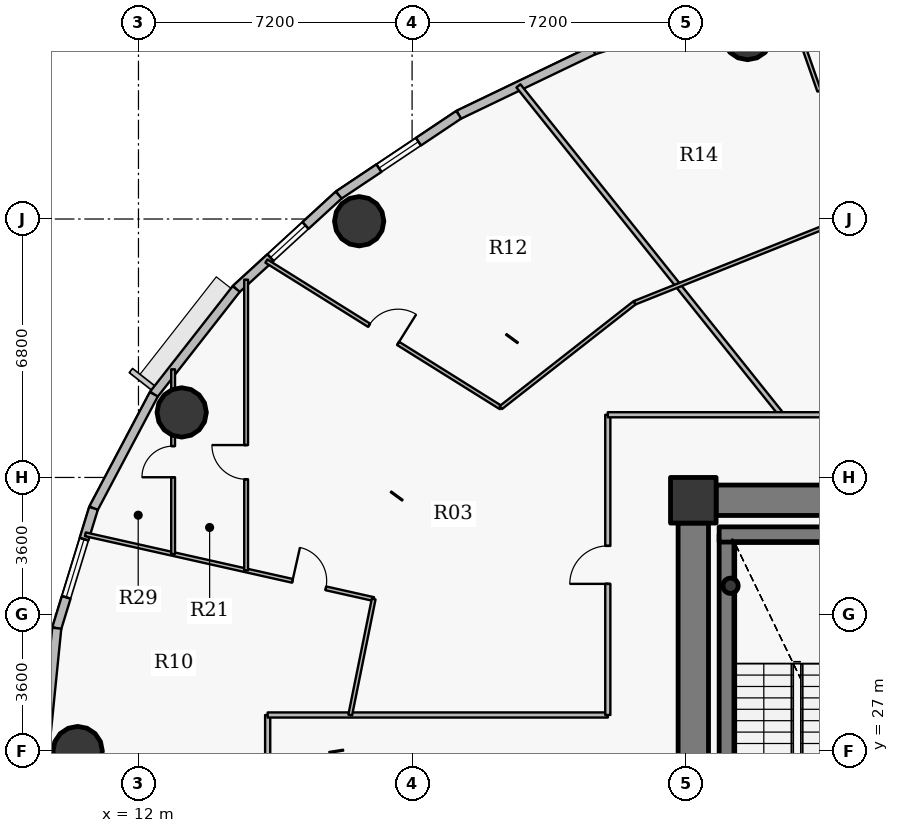
"""IFC4 building model, lengths in metres.
Left out: names, types, materials, properties, quantities, classifications, styles, units other than length and angle.
Written with IfcOpenShell. Run it as: python <this file> out.ifc"""

import sys

from ifc_helpers import new_model, si_unit, direction, frame, frame_2d, origin, origin_2d, place, context, subcontext, project, spatial, rectangle, hollow_circle, extrude, source, transform, mapped, element, fill, save


model = new_model("IFC4")
c1 = context("Model", 3, precision=1e-05, world=origin(), true_north=direction((0.0, 1.0)))
c2 = subcontext(c1, "Body", "Model", "MODEL_VIEW")
j1 = project(units=[si_unit("LENGTHUNIT", "METRE"), si_unit("PLANEANGLEUNIT", "RADIAN")], contexts=[c1])
p1 = place(None, origin())
s1 = spatial("IfcSite", under=j1, at=p1, CompositionType="ELEMENT")
p2 = place(p1, origin())
s2 = spatial("IfcBuilding", under=s1, at=p2, CompositionType="ELEMENT")
p3 = place(p2, frame((0.0, 0.0, 174.9)))
s3 = spatial("IfcBuildingStorey", under=s2, at=p3, CompositionType="ELEMENT", Elevation=174.9)
p4 = place(p3, frame((26.6, 33.6, 0.0), z_axis=(0.0, 0.0, 1.0), x_axis=(1.0, 0.0, 0.0)))
e1 = element("IfcColumn", 1, at=p4, inside=s3, PredefinedType="COLUMN", context=c2, shape_type="SweptSolid", body=[
    extrude(rectangle(XDim=1.2, YDim=1.2, at=origin_2d()), origin(), (0.0, 0.0, 1.0), 3.75),
])
p5 = place(p3, frame((27.48, 24.1, 0.0), z_axis=(0.0, 0.0, 1.0), x_axis=(0.0, 1.0, 0.0)))
e2 = element("IfcWall", 2, at=p5, inside=s3, PredefinedType="SHEAR", context=c2, shape_type="SweptSolid", body=[
    extrude(rectangle(XDim=8.6, YDim=0.4, at=frame_2d((4.3, 0.0))), origin(), (0.0, 0.0, 1.0), 3.75),
])
p6 = place(p3, frame((27.28, 32.7, 0.0), z_axis=(0.0, 0.0, 1.0), x_axis=(1.0, 0.0, 0.0)))
e3 = element("IfcWall", 3, at=p6, inside=s3, PredefinedType="SHEAR", context=c2, shape_type="SweptSolid", body=[
    extrude(rectangle(XDim=4.1, YDim=0.4, at=frame_2d((2.05, 0.0))), origin(), (0.0, 0.0, 1.0), 3.75),
])
p7 = place(p3, frame((27.58, 31.35, 0.0), z_axis=(0.0, 0.0, 1.0), x_axis=(1.0, 0.0, 0.0)))
e4 = element("IfcColumn", 4, at=p7, inside=s3, PredefinedType="COLUMN", context=c2, shape_type="SweptSolid", body=[
    extrude(hollow_circle(Radius=0.203, WallThickness=0.016, at=origin_2d()), origin(), (0.0, 0.0, 1.0), 3.75),
])
p8 = place(p3, frame((27.2, 33.6, 0.0), z_axis=(0.0, 0.0, 1.0), x_axis=(1.0, 0.0, 0.0)))
e5 = element("IfcWall", 5, at=p8, inside=s3, PredefinedType="SHEAR", context=c2, shape_type="SweptSolid", body=[
    extrude(rectangle(XDim=17.6, YDim=0.8, at=frame_2d((8.8, 0.0))), origin(), (0.0, 0.0, 1.0), 2.95),
])
p9 = place(p8, frame((13.45, 0.0, 0.0)))
e6 = element("IfcOpeningElement", 6, at=p9, cuts=e5, PredefinedType="OPENING", context=c2, shape_type="SweptSolid", body=[
    extrude(rectangle(XDim=1.15, YDim=2.15, at=origin_2d()), frame((0.575, 0.41, 1.075), z_axis=(0.0, -1.0, 0.0), x_axis=(1.0, 0.0, 0.0)), (0.0, 0.0, 1.0), 0.82),
])
p10 = place(p3, frame((26.6, 21.0, 0.0), z_axis=(0.0, 0.0, 1.0), x_axis=(0.0, 1.0, 0.0)))
e7 = element("IfcWall", 7, at=p10, inside=s3, PredefinedType="SHEAR", context=c2, shape_type="SweptSolid", body=[
    extrude(rectangle(XDim=12.0, YDim=0.8, at=frame_2d((6.0, 0.0))), origin(), (0.0, 0.0, 1.0), 2.95),
])
p11 = place(p10, frame((1.061, 0.0, 0.0)))
e8 = element("IfcOpeningElement", 8, at=p11, cuts=e7, PredefinedType="OPENING", context=c2, shape_type="SweptSolid", body=[
    extrude(rectangle(XDim=1.15, YDim=2.15, at=origin_2d()), frame((0.575, 0.41, 1.075), z_axis=(0.0, -1.0, 0.0), x_axis=(1.0, 0.0, 0.0)), (0.0, 0.0, 1.0), 0.82),
])
for number, where, z_axis, x_axis in (
    (9, (28.027, 45.841, 0.0), (0.0, 0.0, 1.0), (1.0, 0.0, 0.0)),
    (10, (17.808, 40.942, 0.0), (0.0, 0.0, 1.0), (1.0, 0.0, 0.0)),
    (11, (13.137, 35.911, 0.0), (0.0, 0.0, 1.0), (1.0, 0.0, 0.0)),
    (12, (10.4, 27.0, 0.0), (0.0, 0.0, 1.0), (1.0, 0.0, 0.0)),
):
    element("IfcColumn", number, at=place(p3, frame(where, z_axis=z_axis, x_axis=x_axis)), inside=s3, PredefinedType="COLUMN", context=c2, shape_type="SweptSolid", body=[
        extrude(hollow_circle(Radius=0.65, WallThickness=0.04, at=origin_2d()), origin(), (0.0, 0.0, 1.0), 3.75),
    ])
p12 = place(p3, frame((23.97, 45.444, 0.0), z_axis=(0.0, 0.0, 1.0), x_axis=(0.951209870236, 0.30854462038, 0.0)))
e13 = element("IfcWall", 13, at=p12, inside=s3, PredefinedType="SOLIDWALL", context=c2, shape_type="SweptSolid", body=[
    extrude(rectangle(XDim=4.038, YDim=0.24, at=frame_2d((2.019, 0.0))), origin(), (0.0, 0.0, 1.0), 3.5),
])
p13 = place(p12, frame((1.019, 0.0, 0.9)))
e14 = element("IfcOpeningElement", 14, at=p13, cuts=e13, PredefinedType="OPENING", context=c2, shape_type="SweptSolid", body=[
    extrude(rectangle(XDim=2.0, YDim=1.75, at=origin_2d()), frame((1.0, 0.13, 0.875), z_axis=(0.0, -1.0, 0.0), x_axis=(1.0, 0.0, 0.0)), (0.0, 0.0, 1.0), 0.26),
])
p14 = place(p3, frame((20.427, 43.743, 0.0), z_axis=(0.0, 0.0, 1.0), x_axis=(0.901564733809, 0.432644231155, 0.0)))
e15 = element("IfcWall", 15, at=p14, inside=s3, PredefinedType="SOLIDWALL", context=c2, shape_type="SweptSolid", body=[
    extrude(rectangle(XDim=3.93, YDim=0.24, at=frame_2d((1.965, 0.0))), origin(), (0.0, 0.0, 1.0), 3.5),
])
p15 = place(p3, frame((17.268, 41.631, 0.0), z_axis=(0.0, 0.0, 1.0), x_axis=(0.831228998277, 0.555930168657, 0.0)))
e16 = element("IfcWall", 16, at=p15, inside=s3, PredefinedType="SOLIDWALL", context=c2, shape_type="SweptSolid", body=[
    extrude(rectangle(XDim=3.8, YDim=0.24, at=frame_2d((1.9, 0.0))), origin(), (0.0, 0.0, 1.0), 3.5),
])
p16 = place(p15, frame((1.275, 0.0, 0.9)))
e17 = element("IfcOpeningElement", 17, at=p16, cuts=e16, PredefinedType="OPENING", context=c2, shape_type="SweptSolid", body=[
    extrude(rectangle(XDim=1.25, YDim=1.65, at=origin_2d()), frame((0.625, 0.13, 0.825), z_axis=(0.0, -1.0, 0.0), x_axis=(1.0, 0.0, 0.0)), (0.0, 0.0, 1.0), 0.26),
])
p17 = place(p3, frame((14.572, 39.158, 0.0), z_axis=(0.0, 0.0, 1.0), x_axis=(0.737076565834, 0.675809245349, 0.0)))
e18 = element("IfcWall", 18, at=p17, inside=s3, PredefinedType="SOLIDWALL", context=c2, shape_type="SweptSolid", body=[
    extrude(rectangle(XDim=3.658, YDim=0.24, at=frame_2d((1.829, 0.0))), origin(), (0.0, 0.0, 1.0), 3.5),
])
p18 = place(p17, frame((1.224, 0.0, 0.9)))
e19 = element("IfcOpeningElement", 19, at=p18, cuts=e18, PredefinedType="OPENING", context=c2, shape_type="SweptSolid", body=[
    extrude(rectangle(XDim=1.25, YDim=1.65, at=origin_2d()), frame((0.625, 0.13, 0.825), z_axis=(0.0, -1.0, 0.0), x_axis=(1.0, 0.0, 0.0)), (0.0, 0.0, 1.0), 0.26),
])
p19 = place(p3, frame((12.404, 36.388, 0.0), z_axis=(0.0, 0.0, 1.0), x_axis=(0.616287674549, 0.787521112224, 0.0)))
e20 = element("IfcWall", 20, at=p19, inside=s3, PredefinedType="SOLIDWALL", context=c2, shape_type="SweptSolid", body=[
    extrude(rectangle(XDim=3.517, YDim=0.24, at=frame_2d((1.759, 0.0))), origin(), (0.0, 0.0, 1.0), 3.5),
])
p20 = place(p3, frame((10.817, 33.389, 0.0), z_axis=(0.0, 0.0, 1.0), x_axis=(0.467586874938, 0.88394712194, 0.0)))
e21 = element("IfcWall", 21, at=p20, inside=s3, PredefinedType="SOLIDWALL", context=c2, shape_type="SweptSolid", body=[
    extrude(rectangle(XDim=3.393, YDim=0.24, at=frame_2d((1.697, 0.0))), origin(), (0.0, 0.0, 1.0), 3.5),
])
p21 = place(p3, frame((9.85, 30.234, 0.0), z_axis=(0.0, 0.0, 1.0), x_axis=(0.293097995113, 0.956082405058, 0.0)))
e22 = element("IfcWall", 22, at=p21, inside=s3, PredefinedType="SOLIDWALL", context=c2, shape_type="SweptSolid", body=[
    extrude(rectangle(XDim=3.3, YDim=0.24, at=frame_2d((1.65, 0.0))), origin(), (0.0, 0.0, 1.0), 3.5),
])
p22 = place(p21, frame((0.85, 0.0, 0.9)))
e23 = element("IfcOpeningElement", 23, at=p22, cuts=e22, PredefinedType="OPENING", context=c2, shape_type="SweptSolid", body=[
    extrude(rectangle(XDim=1.6, YDim=1.75, at=origin_2d()), frame((0.8, 0.13, 0.875), z_axis=(0.0, -1.0, 0.0), x_axis=(1.0, 0.0, 0.0)), (0.0, 0.0, 1.0), 0.26),
])
for number, where, z_axis, x_axis in (
    (24, (9.525, 27.0, 0.0), (0.0, 0.0, 1.0), (0.1, 0.995, 0.0)),
    (25, (9.85, 23.766, 0.0), (0.0, 0.0, 1.0), (-0.1, 0.995, 0.0)),
):
    element("IfcWall", number, at=place(p3, frame(where, z_axis=z_axis, x_axis=x_axis)), inside=s3, PredefinedType="SOLIDWALL", context=c2, shape_type="SweptSolid", body=[
        extrude(rectangle(XDim=3.25, YDim=0.24, at=frame_2d((1.625, 0.0))), origin(), (0.0, 0.0, 1.0), 3.5),
    ])
p23 = place(p3, frame((10.602, 32.704, 0.0), z_axis=(0.0, 0.0, 1.0), x_axis=(0.9756977614, -0.21912069368, 0.0)))
e26 = element("IfcWall", 26, at=p23, inside=s3, PredefinedType="PARTITIONING", context=c2, shape_type="SweptSolid", body=[
    extrude(rectangle(XDim=7.776, YDim=0.1, at=frame_2d((3.888, 0.0))), origin(), (0.0, 0.0, 1.0), 2.935),
])
p24 = place(p23, frame((5.586, 0.0, 0.0)))
e27 = element("IfcOpeningElement", 27, at=p24, cuts=e26, PredefinedType="OPENING", context=c2, shape_type="SweptSolid", body=[
    extrude(rectangle(XDim=0.9, YDim=2.1, at=origin_2d()), frame((0.45, 0.06, 1.05), z_axis=(0.0, -1.0, 0.0), x_axis=(1.0, 0.0, 0.0)), (0.0, 0.0, 1.0), 0.12),
])
p25 = place(p3, frame((12.912, 32.185, 0.0), z_axis=(0.0, 0.0, 1.0), x_axis=(0.0, 1.0, 0.0)))
e28 = element("IfcWall", 28, at=p25, inside=s3, PredefinedType="PARTITIONING", context=c2, shape_type="SweptSolid", body=[
    extrude(rectangle(XDim=4.86, YDim=0.1, at=frame_2d((2.43, 0.0))), origin(), (0.0, 0.0, 1.0), 2.935),
])
p26 = place(p25, frame((2.02, 0.0, 0.0)))
e29 = element("IfcOpeningElement", 29, at=p26, cuts=e28, PredefinedType="OPENING", context=c2, shape_type="SweptSolid", body=[
    extrude(rectangle(XDim=0.82, YDim=2.1, at=origin_2d()), frame((0.41, 0.06, 1.05), z_axis=(0.0, -1.0, 0.0), x_axis=(1.0, 0.0, 0.0)), (0.0, 0.0, 1.0), 0.12),
])
p27 = place(p3, frame((14.833, 31.754, 0.0), z_axis=(0.0, 0.0, 1.0), x_axis=(0.0, 1.0, 0.0)))
e30 = element("IfcWall", 30, at=p27, inside=s3, PredefinedType="PARTITIONING", context=c2, shape_type="SweptSolid", body=[
    extrude(rectangle(XDim=7.651, YDim=0.1, at=frame_2d((3.825, 0.0))), origin(), (0.0, 0.0, 1.0), 2.935),
])
p28 = place(p27, frame((2.399, 0.0, 0.0)))
e31 = element("IfcOpeningElement", 31, at=p28, cuts=e30, PredefinedType="OPENING", context=c2, shape_type="SweptSolid", body=[
    extrude(rectangle(XDim=0.9, YDim=2.1, at=origin_2d()), frame((0.45, 0.06, 1.05), z_axis=(0.0, -1.0, 0.0), x_axis=(1.0, 0.0, 0.0)), (0.0, 0.0, 1.0), 0.12),
])
p29 = place(p3, frame((15.366, 39.894, 0.0), z_axis=(0.0, 0.0, 1.0), x_axis=(0.84804732756, -0.529920494242, 0.0)))
e32 = element("IfcWall", 32, at=p29, inside=s3, PredefinedType="PARTITIONING", context=c2, shape_type="SweptSolid", body=[
    extrude(rectangle(XDim=7.274, YDim=0.1, at=frame_2d((3.637, 0.0))), origin(), (0.0, 0.0, 1.0), 2.935),
])
p30 = place(p29, frame((3.187, 0.0, 0.0)))
e33 = element("IfcOpeningElement", 33, at=p30, cuts=e32, PredefinedType="OPENING", context=c2, shape_type="SweptSolid", body=[
    extrude(rectangle(XDim=0.9, YDim=2.1, at=origin_2d()), frame((0.45, 0.06, 1.05), z_axis=(0.0, -1.0, 0.0), x_axis=(1.0, 0.0, 0.0)), (0.0, 0.0, 1.0), 0.12),
])
p31 = place(p3, frame((15.4, 23.146, 0.0), z_axis=(0.0, 0.0, 1.0), x_axis=(0.0, 1.0, 0.0)))
e34 = element("IfcWall", 34, at=p31, inside=s3, PredefinedType="PARTITIONING", context=c2, shape_type="SweptSolid", body=[
    extrude(rectangle(XDim=4.804, YDim=0.135, at=frame_2d((2.402, 0.0))), origin(), (0.0, 0.0, 1.0), 2.935),
])
p32 = place(p3, frame((15.4, 27.95, 0.0), z_axis=(0.0, 0.0, 1.0), x_axis=(1.0, 0.0, 0.0)))
e35 = element("IfcWall", 35, at=p32, inside=s3, PredefinedType="PARTITIONING", context=c2, shape_type="SweptSolid", body=[
    extrude(rectangle(XDim=8.95, YDim=0.135, at=frame_2d((4.475, 0.0))), origin(), (0.0, 0.0, 1.0), 3.5),
])
p33 = place(p3, frame((17.572, 27.95, 0.0), z_axis=(0.0, 0.0, 1.0), x_axis=(0.19818274337, 0.980165088253, 0.0)))
e36 = element("IfcWall", 36, at=p33, inside=s3, PredefinedType="PARTITIONING", context=c2, shape_type="SweptSolid", body=[
    extrude(rectangle(XDim=3.112, YDim=0.1, at=frame_2d((1.556, 0.0))), origin(), (0.0, 0.0, 1.0), 3.5),
])
p34 = place(p3, frame((21.534, 36.039, 0.0), z_axis=(0.0, 0.0, 1.0), x_axis=(0.787313734036, 0.616552580238, 0.0)))
e37 = element("IfcWall", 37, at=p34, inside=s3, PredefinedType="PARTITIONING", context=c2, shape_type="SweptSolid", body=[
    extrude(rectangle(XDim=4.472, YDim=0.1, at=frame_2d((2.236, 0.0))), origin(), (0.0, 0.0, 1.0), 2.935),
])
p35 = place(p3, frame((21.999, 44.503, 0.0), z_axis=(0.0, 0.0, 1.0), x_axis=(0.624673551917, -0.780886005468, 0.0)))
e38 = element("IfcWall", 38, at=p35, inside=s3, PredefinedType="PARTITIONING", context=c2, shape_type="SweptSolid", body=[
    extrude(rectangle(XDim=11.081, YDim=0.135, at=frame_2d((5.541, 0.0))), origin(), (0.0, 0.0, 1.0), 2.935),
])
p36 = place(p3, frame((24.35, 27.95, 0.0), z_axis=(0.0, 0.0, 1.0), x_axis=(0.0, 1.0, 0.0)))
e39 = element("IfcWall", 39, at=p36, inside=s3, PredefinedType="PARTITIONING", context=c2, shape_type="SweptSolid", body=[
    extrude(rectangle(XDim=7.9, YDim=0.135, at=frame_2d((3.95, 0.0))), origin(), (0.0, 0.0, 1.0), 2.935),
])
p37 = place(p36, frame((3.45, 0.0, 0.0)))
e40 = element("IfcOpeningElement", 40, at=p37, cuts=e39, PredefinedType="OPENING", context=c2, shape_type="SweptSolid", body=[
    extrude(rectangle(XDim=1.0, YDim=2.15, at=origin_2d()), frame((0.5, 0.078, 1.075), z_axis=(0.0, -1.0, 0.0), x_axis=(1.0, 0.0, 0.0)), (0.0, 0.0, 1.0), 0.155),
])
p38 = place(p3, frame((24.35, 35.85, 0.0), z_axis=(0.0, 0.0, 1.0), x_axis=(1.0, 0.0, 0.0)))
e41 = element("IfcWall", 41, at=p38, inside=s3, PredefinedType="PARTITIONING", context=c2, shape_type="SweptSolid", body=[
    extrude(rectangle(XDim=11.654, YDim=0.135, at=frame_2d((5.827, 0.0))), origin(), (0.0, 0.0, 1.0), 2.935),
])
p39 = place(p38, frame((7.592, 0.0, 0.0)))
e42 = element("IfcOpeningElement", 42, at=p39, cuts=e41, PredefinedType="OPENING", context=c2, shape_type="SweptSolid", body=[
    extrude(rectangle(XDim=1.0, YDim=2.15, at=origin_2d()), frame((0.5, 0.078, 1.075), z_axis=(0.0, -1.0, 0.0), x_axis=(1.0, 0.0, 0.0)), (0.0, 0.0, 1.0), 0.155),
])
p40 = place(p3, frame((25.055, 38.796, 0.0), z_axis=(0.0, 0.0, 1.0), x_axis=(0.928798710424, 0.370584613166, 0.0)))
e43 = element("IfcWall", 43, at=p40, inside=s3, PredefinedType="PARTITIONING", context=c2, shape_type="SweptSolid", body=[
    extrude(rectangle(XDim=5.589, YDim=0.1, at=frame_2d((2.794, 0.0))), origin(), (0.0, 0.0, 1.0), 2.935),
])
p41 = place(p3, frame((29.018, 46.921, 0.0), z_axis=(0.0, 0.0, 1.0), x_axis=(0.330774858624, -0.943709697366, 0.0)))
e44 = element("IfcWall", 44, at=p41, inside=s3, PredefinedType="PARTITIONING", context=c2, shape_type="SweptSolid", body=[
    extrude(rectangle(XDim=6.302, YDim=0.1, at=frame_2d((3.151, 0.0))), origin(), (0.0, 0.0, 1.0), 2.935),
])
p42 = place(p41, frame((2.701, 0.0, 0.0)))
e45 = element("IfcOpeningElement", 45, at=p42, cuts=e44, PredefinedType="OPENING", context=c2, shape_type="SweptSolid", body=[
    extrude(rectangle(XDim=0.9, YDim=2.1, at=origin_2d()), frame((0.45, 0.06, 1.05), z_axis=(0.0, -1.0, 0.0), x_axis=(1.0, 0.0, 0.0)), (0.0, 0.0, 1.0), 0.12),
])
p43 = place(p3, frame((27.19, 34.0, 0.0), z_axis=(0.0, 0.0, 1.0), x_axis=(-1.0, 0.0, 0.0)))
e46 = element("IfcWall", 46, at=p43, inside=s3, PredefinedType="PARTITIONING", context=c2, shape_type="SweptSolid", body=[
    extrude(rectangle(XDim=0.99, YDim=0.135, at=frame_2d((0.495, 0.0))), origin(), (0.0, 0.0, 1.0), 2.935),
])
p44 = place(p3, frame((26.2, 33.692, 0.0), z_axis=(0.0, 0.0, 1.0), x_axis=(0.0, -1.0, 0.0)))
e47 = element("IfcWall", 47, at=p44, inside=s3, PredefinedType="PARTITIONING", context=c2, shape_type="SweptSolid", body=[
    extrude(rectangle(XDim=0.682, YDim=0.135, at=frame_2d((0.341, 0.0))), origin(), (0.0, 0.0, 1.0), 3.5),
])
m1 = source(origin(), c2, "Body", "SweptSolid", [
    extrude(rectangle(XDim=1.6, YDim=1.75, at=origin_2d()), frame((0.8, 0.03, 0.875), z_axis=(0.0, -1.0, 0.0), x_axis=(1.0, 0.0, 0.0)), (0.0, 0.0, 1.0), 0.06),
])
p45 = place(p22, origin())
e48 = element("IfcWindow", 48, at=p45, inside=s3, PartitioningType="DOUBLE_PANEL_VERTICAL", PredefinedType="WINDOW", context=c2, shape_type="MappedRepresentation", body=[
    mapped(m1, transform((0.0, 0.0, 0.0), x_axis=(1.0, 0.0, 0.0), y_axis=(0.0, 1.0, 0.0), z_axis=(0.0, 0.0, 1.0), scale=1.0)),
])
fill(e23, e48)
m2 = source(origin(), c2, "Body", "SweptSolid", [
    extrude(rectangle(XDim=1.25, YDim=1.65, at=origin_2d()), frame((0.625, 0.03, 0.825), z_axis=(0.0, -1.0, 0.0), x_axis=(1.0, 0.0, 0.0)), (0.0, 0.0, 1.0), 0.06),
])
p46 = place(p18, origin())
e49 = element("IfcWindow", 49, at=p46, inside=s3, PartitioningType="SINGLE_PANEL", PredefinedType="WINDOW", context=c2, shape_type="MappedRepresentation", body=[
    mapped(m2, transform((0.0, 0.0, 0.0), x_axis=(1.0, 0.0, 0.0), y_axis=(0.0, 1.0, 0.0), z_axis=(0.0, 0.0, 1.0), scale=1.0)),
])
fill(e19, e49)
p47 = place(p16, origin())
e50 = element("IfcWindow", 50, at=p47, inside=s3, PartitioningType="SINGLE_PANEL", PredefinedType="WINDOW", context=c2, shape_type="MappedRepresentation", body=[
    mapped(m2, transform((0.0, 0.0, 0.0), x_axis=(1.0, 0.0, 0.0), y_axis=(0.0, 1.0, 0.0), z_axis=(0.0, 0.0, 1.0), scale=1.0)),
])
fill(e17, e50)
m3 = source(origin(), c2, "Body", "SweptSolid", [
    extrude(rectangle(XDim=0.9, YDim=2.1, at=origin_2d()), frame((0.45, 0.025, 1.05), z_axis=(0.0, -1.0, 0.0), x_axis=(1.0, 0.0, 0.0)), (0.0, 0.0, 1.0), 0.05),
])
p48 = place(p42, origin())
e51 = element("IfcDoor", 51, at=p48, inside=s3, OperationType="SINGLE_SWING_RIGHT", PredefinedType="DOOR", context=c2, shape_type="MappedRepresentation", body=[
    mapped(m3, transform((0.0, 0.0, 0.0), x_axis=(1.0, 0.0, 0.0), y_axis=(0.0, 1.0, 0.0), z_axis=(0.0, 0.0, 1.0), scale=1.0)),
])
fill(e45, e51)
m4 = source(origin(), c2, "Body", "SweptSolid", [
    extrude(rectangle(XDim=1.0, YDim=2.15, at=origin_2d()), frame((0.5, 0.025, 1.075), z_axis=(0.0, -1.0, 0.0), x_axis=(1.0, 0.0, 0.0)), (0.0, 0.0, 1.0), 0.05),
])
p49 = place(p37, origin())
e52 = element("IfcDoor", 52, at=p49, inside=s3, OperationType="SINGLE_SWING_LEFT", PredefinedType="DOOR", context=c2, shape_type="MappedRepresentation", body=[
    mapped(m4, transform((0.0, 0.0, 0.0), x_axis=(1.0, 0.0, 0.0), y_axis=(0.0, 1.0, 0.0), z_axis=(0.0, 0.0, 1.0), scale=1.0)),
])
fill(e40, e52)
p50 = place(p30, origin())
e53 = element("IfcDoor", 53, at=p50, inside=s3, OperationType="SINGLE_SWING_RIGHT", PredefinedType="DOOR", context=c2, shape_type="MappedRepresentation", body=[
    mapped(m3, transform((0.0, 0.0, 0.0), x_axis=(1.0, 0.0, 0.0), y_axis=(0.0, 1.0, 0.0), z_axis=(0.0, 0.0, 1.0), scale=1.0)),
])
fill(e33, e53)
p51 = place(p24, origin())
e54 = element("IfcDoor", 54, at=p51, inside=s3, OperationType="SINGLE_SWING_LEFT", PredefinedType="DOOR", context=c2, shape_type="MappedRepresentation", body=[
    mapped(m3, transform((0.0, 0.0, 0.0), x_axis=(1.0, 0.0, 0.0), y_axis=(0.0, 1.0, 0.0), z_axis=(0.0, 0.0, 1.0), scale=1.0)),
])
fill(e27, e54)
p52 = place(p28, origin())
e55 = element("IfcDoor", 55, at=p52, inside=s3, OperationType="SINGLE_SWING_RIGHT", PredefinedType="DOOR", context=c2, shape_type="MappedRepresentation", body=[
    mapped(m3, transform((0.0, 0.0, 0.0), x_axis=(1.0, 0.0, 0.0), y_axis=(0.0, 1.0, 0.0), z_axis=(0.0, 0.0, 1.0), scale=1.0)),
])
fill(e31, e55)
m5 = source(origin(), c2, "Body", "SweptSolid", [
    extrude(rectangle(XDim=0.82, YDim=2.1, at=origin_2d()), frame((0.41, 0.025, 1.05), z_axis=(0.0, -1.0, 0.0), x_axis=(1.0, 0.0, 0.0)), (0.0, 0.0, 1.0), 0.05),
])
p53 = place(p26, origin())
e56 = element("IfcDoor", 56, at=p53, inside=s3, OperationType="SINGLE_SWING_LEFT", PredefinedType="DOOR", context=c2, shape_type="MappedRepresentation", body=[
    mapped(m5, transform((0.0, 0.0, 0.0), x_axis=(1.0, 0.0, 0.0), y_axis=(0.0, 1.0, 0.0), z_axis=(0.0, 0.0, 1.0), scale=1.0)),
])
fill(e29, e56)
save(model, sys.argv[1])
